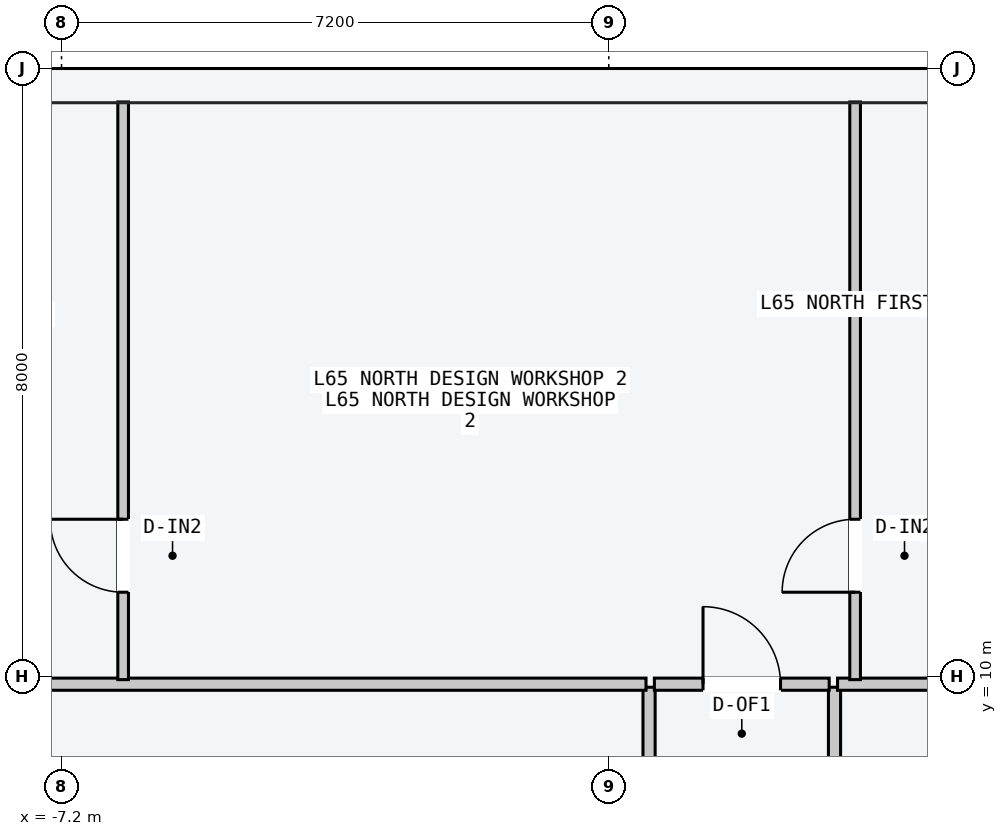
"""IFC4 building model, lengths in metres.
Left out: names, types, materials, properties, quantities, classifications, styles, units other than length and angle.
Written with IfcOpenShell. Run it as: python <this file> out.ifc"""

import sys

from ifc_helpers import new_model, si_unit, direction, frame, frame_2d, origin, place, context, subcontext, project, spatial, rectangle, extrude, element, fill, save


model = new_model("IFC4")
c1 = context("Model", 3, precision=1e-05, world=origin(), true_north=direction((0.0, 1.0)))
c2 = subcontext(c1, "Body", "Model", "MODEL_VIEW")
j1 = project(units=[si_unit("LENGTHUNIT", "METRE"), si_unit("PLANEANGLEUNIT", "RADIAN")], contexts=[c1])
p1 = place(None, origin())
s1 = spatial("IfcSite", under=j1, at=p1, CompositionType="ELEMENT")
p2 = place(p1, origin())
s2 = spatial("IfcBuilding", under=s1, at=p2, CompositionType="ELEMENT")
p3 = place(p2, frame((0.0, 0.0, 247.2)))
s3 = spatial("IfcBuildingStorey", under=s2, at=p3, CompositionType="ELEMENT", Elevation=247.2)
p4 = place(p3, frame((0.53, -3.5, 0.0), z_axis=(0.0, 0.0, 1.0), x_axis=(0.0, 1.0, 0.0)))
e1 = element("IfcWall", 1, at=p4, inside=s3, PredefinedType="PARTITIONING", context=c2, shape_type="SweptSolid", body=[
    extrude(rectangle(XDim=13.36, YDim=0.16, at=frame_2d((6.68, 0.0))), origin(), (0.0, 0.0, 1.0), 3.4),
])
p5 = place(p4, frame((6.1, 0.0, 0.0)))
e2 = element("IfcOpeningElement", 2, at=p5, cuts=e1, PredefinedType="OPENING", context=c2, shape_type="SweptSolid", body=[
    extrude(rectangle(XDim=1.24, YDim=2.24, at=frame_2d((0.62, 1.12))), frame((0.0, 0.09, 0.0), z_axis=(0.0, -1.0, 0.0), x_axis=(1.0, 0.0, 0.0)), (0.0, 0.0, 1.0), 0.18),
])
p6 = place(p4, frame((1.6, 0.0, 0.0)))
e3 = element("IfcOpeningElement", 3, at=p6, cuts=e1, PredefinedType="OPENING", context=c2, shape_type="SweptSolid", body=[
    extrude(rectangle(XDim=0.96, YDim=2.18, at=frame_2d((0.48, 1.09))), frame((0.0, 0.09, 0.0), z_axis=(0.0, -1.0, 0.0), x_axis=(1.0, 0.0, 0.0)), (0.0, 0.0, 1.0), 0.18),
])
p7 = place(p3, frame((-7.5, 9.9, 0.0), z_axis=(0.0, 0.0, 1.0), x_axis=(1.0, 0.0, 0.0)))
e4 = element("IfcWall", 4, at=p7, inside=s3, PredefinedType="PARTITIONING", context=c2, shape_type="SweptSolid", body=[
    extrude(rectangle(XDim=7.99, YDim=0.16, at=frame_2d((3.995, 0.0))), origin(), (0.0, 0.0, 1.0), 3.4),
])
p8 = place(p3, frame((2.97, -3.5, 0.0), z_axis=(0.0, 0.0, 1.0), x_axis=(0.0, 1.0, 0.0)))
e5 = element("IfcWall", 5, at=p8, inside=s3, PredefinedType="PARTITIONING", context=c2, shape_type="SweptSolid", body=[
    extrude(rectangle(XDim=13.36, YDim=0.16, at=frame_2d((6.68, 0.0))), origin(), (0.0, 0.0, 1.0), 3.4),
])
p9 = place(p8, frame((6.1, 0.0, 0.0)))
e6 = element("IfcOpeningElement", 6, at=p9, cuts=e5, PredefinedType="OPENING", context=c2, shape_type="SweptSolid", body=[
    extrude(rectangle(XDim=1.24, YDim=2.24, at=frame_2d((0.62, 1.12))), frame((0.0, 0.09, 0.0), z_axis=(0.0, -1.0, 0.0), x_axis=(1.0, 0.0, 0.0)), (0.0, 0.0, 1.0), 0.18),
])
p10 = place(p8, frame((1.6, 0.0, 0.0)))
e7 = element("IfcOpeningElement", 7, at=p10, cuts=e5, PredefinedType="OPENING", context=c2, shape_type="SweptSolid", body=[
    extrude(rectangle(XDim=0.96, YDim=2.18, at=frame_2d((0.48, 1.09))), frame((0.0, 0.09, 0.0), z_axis=(0.0, -1.0, 0.0), x_axis=(1.0, 0.0, 0.0)), (0.0, 0.0, 1.0), 0.18),
])
p11 = place(p3, frame((3.01, 9.9, 0.0), z_axis=(0.0, 0.0, 1.0), x_axis=(1.0, 0.0, 0.0)))
e8 = element("IfcWall", 8, at=p11, inside=s3, PredefinedType="PARTITIONING", context=c2, shape_type="SweptSolid", body=[
    extrude(rectangle(XDim=4.49, YDim=0.16, at=frame_2d((2.245, 0.0))), origin(), (0.0, 0.0, 1.0), 3.4),
])
p12 = place(p3, frame((-6.39, 9.96, 0.0), z_axis=(0.0, 0.0, 1.0), x_axis=(0.0, 1.0, 0.0)))
e9 = element("IfcWall", 9, at=p12, inside=s3, PredefinedType="PARTITIONING", context=c2, shape_type="SweptSolid", body=[
    extrude(rectangle(XDim=7.6, YDim=0.14, at=frame_2d((3.8, 0.0))), origin(), (0.0, 0.0, 1.0), 3.4),
])
p13 = place(p12, frame((1.15, 0.0, 0.0)))
e10 = element("IfcOpeningElement", 10, at=p13, cuts=e9, PredefinedType="OPENING", context=c2, shape_type="SweptSolid", body=[
    extrude(rectangle(XDim=0.96, YDim=2.18, at=frame_2d((0.48, 1.09))), frame((0.0, 0.08, 0.0), z_axis=(0.0, -1.0, 0.0), x_axis=(1.0, 0.0, 0.0)), (0.0, 0.0, 1.0), 0.16),
])
p14 = place(p3, frame((3.241, 9.96, 0.0), z_axis=(0.0, 0.0, 1.0), x_axis=(0.0, 1.0, 0.0)))
e11 = element("IfcWall", 11, at=p14, inside=s3, PredefinedType="PARTITIONING", context=c2, shape_type="SweptSolid", body=[
    extrude(rectangle(XDim=7.6, YDim=0.14, at=frame_2d((3.8, 0.0))), origin(), (0.0, 0.0, 1.0), 3.4),
])
p15 = place(p14, frame((1.15, 0.0, 0.0)))
e12 = element("IfcOpeningElement", 12, at=p15, cuts=e11, PredefinedType="OPENING", context=c2, shape_type="SweptSolid", body=[
    extrude(rectangle(XDim=0.96, YDim=2.18, at=frame_2d((0.48, 1.09))), frame((0.0, 0.08, 0.0), z_axis=(0.0, -1.0, 0.0), x_axis=(1.0, 0.0, 0.0)), (0.0, 0.0, 1.0), 0.16),
])
p16 = place(p3, frame((0.6, 9.9, 0.0), z_axis=(0.0, 0.0, 1.0), x_axis=(1.0, 0.0, 0.0)))
e13 = element("IfcWall", 13, at=p16, inside=s3, PredefinedType="PARTITIONING", context=c2, shape_type="SweptSolid", body=[
    extrude(rectangle(XDim=2.3, YDim=0.16, at=frame_2d((1.15, 0.0))), origin(), (0.0, 0.0, 1.0), 3.4),
])
p17 = place(p16, frame((0.64, 0.0, 0.0)))
e14 = element("IfcOpeningElement", 14, at=p17, cuts=e13, PredefinedType="OPENING", context=c2, shape_type="SweptSolid", body=[
    extrude(rectangle(XDim=1.02, YDim=2.2, at=frame_2d((0.51, 1.1))), frame((0.0, 0.09, 0.0), z_axis=(0.0, -1.0, 0.0), x_axis=(1.0, 0.0, 0.0)), (0.0, 0.0, 1.0), 0.18),
])
p18 = place(p13, origin())
e15 = element("IfcDoor", 15, at=p18, inside=s3, OperationType="SINGLE_SWING_RIGHT", PredefinedType="DOOR", context=c2, shape_type="SweptSolid", body=[
    extrude(rectangle(XDim=0.96, YDim=2.18, at=frame_2d((0.48, 1.09))), frame((0.0, 0.025, 0.0), z_axis=(0.0, -1.0, 0.0), x_axis=(1.0, 0.0, 0.0)), (0.0, 0.0, 1.0), 0.05),
])
fill(e10, e15)
p19 = place(p15, origin())
e16 = element("IfcDoor", 16, at=p19, inside=s3, OperationType="SINGLE_SWING_LEFT", PredefinedType="DOOR", context=c2, shape_type="SweptSolid", body=[
    extrude(rectangle(XDim=0.96, YDim=2.18, at=frame_2d((0.48, 1.09))), frame((0.0, 0.025, 0.0), z_axis=(0.0, -1.0, 0.0), x_axis=(1.0, 0.0, 0.0)), (0.0, 0.0, 1.0), 0.05),
])
fill(e12, e16)
p20 = place(p17, origin())
e17 = element("IfcDoor", 17, at=p20, inside=s3, OperationType="SINGLE_SWING_LEFT", PredefinedType="DOOR", context=c2, shape_type="SweptSolid", body=[
    extrude(rectangle(XDim=1.02, YDim=2.2, at=frame_2d((0.51, 1.1))), frame((0.0, 0.025, 0.0), z_axis=(0.0, -1.0, 0.0), x_axis=(1.0, 0.0, 0.0)), (0.0, 0.0, 1.0), 0.05),
])
fill(e14, e17)
save(model, sys.argv[1])
